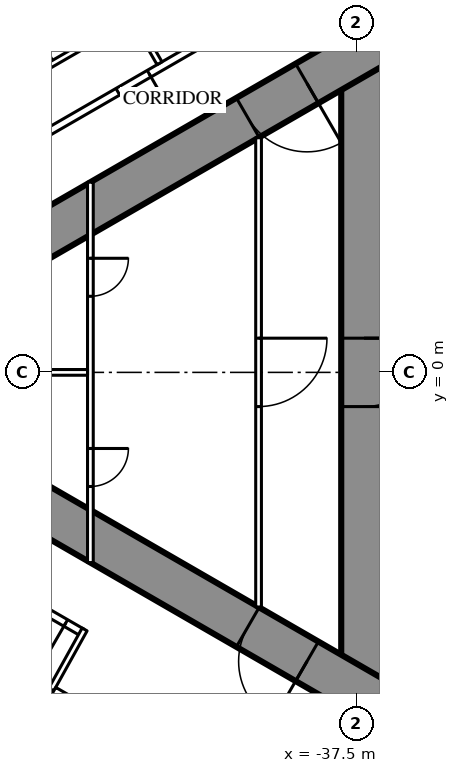
"""IFC4 building model, lengths in metres.
Left out: names, types, materials, properties, quantities, classifications, styles, units other than length and angle.
Written with IfcOpenShell. Run it as: python <this file> out.ifc"""

import sys

from ifc_helpers import new_model, si_unit, direction, frame, frame_2d, origin, place, context, subcontext, project, spatial, rectangle, extrude, element, fill, save


model = new_model("IFC4")
c1 = context("Model", 3, precision=1e-05, world=origin(), true_north=direction((0.0, 1.0)))
c2 = subcontext(c1, "Body", "Model", "MODEL_VIEW")
j1 = project(units=[si_unit("LENGTHUNIT", "METRE"), si_unit("PLANEANGLEUNIT", "RADIAN")], contexts=[c1])
p1 = place(None, origin())
s1 = spatial("IfcSite", under=j1, at=p1, CompositionType="ELEMENT")
p2 = place(p1, origin())
s2 = spatial("IfcBuilding", under=s1, at=p2, CompositionType="ELEMENT")
p3 = place(p2, frame((0.0, 0.0, 222.5)))
s3 = spatial("IfcBuildingStorey", under=s2, at=p3, CompositionType="ELEMENT", Elevation=222.5)
p4 = place(p3, frame((-37.3, 8.6, 0.0), z_axis=(0.0, 0.0, 1.0), x_axis=(0.0, -1.0, 0.0)))
e1 = element("IfcWall", 1, at=p4, inside=s3, PredefinedType="SHEAR", context=c2, shape_type="SweptSolid", body=[
    extrude(rectangle(XDim=17.2, YDim=1.2, at=frame_2d((8.6, 0.0))), origin(), (0.0, 0.0, 1.0), 3.6),
])
p5 = place(p4, frame((7.7, 0.0, 0.0)))
e2 = element("IfcOpeningElement", 2, at=p5, cuts=e1, PredefinedType="OPENING", context=c2, shape_type="SweptSolid", body=[
    extrude(rectangle(XDim=1.8, YDim=2.2, at=frame_2d((0.9, 1.1))), frame((0.0, 0.61, 0.0), z_axis=(0.0, -1.0, 0.0), x_axis=(1.0, 0.0, 0.0)), (0.0, 0.0, 1.0), 1.22),
])
p6 = place(p3, frame((-27.2, 14.3, 0.0), z_axis=(0.0, 0.0, 1.0), x_axis=(-0.866026593062, -0.499997940104, 0.0)))
e3 = element("IfcWall", 3, at=p6, inside=s3, PredefinedType="SHEAR", context=c2, shape_type="SweptSolid", body=[
    extrude(rectangle(XDim=28.946, YDim=1.2, at=frame_2d((14.473, 0.0))), origin(), (0.0, 0.0, 1.0), 3.6),
])
p7 = place(p6, frame((4.6, 0.0, 0.0)))
e4 = element("IfcOpeningElement", 4, at=p7, cuts=e3, PredefinedType="OPENING", context=c2, shape_type="SweptSolid", body=[
    extrude(rectangle(XDim=1.0, YDim=2.2, at=frame_2d((0.5, 1.1))), frame((0.0, 0.61, 0.0), z_axis=(0.0, -1.0, 0.0), x_axis=(1.0, 0.0, 0.0)), (0.0, 0.0, 1.0), 1.22),
])
p8 = place(p6, frame((13.395, 0.0, 0.0)))
e5 = element("IfcOpeningElement", 5, at=p8, cuts=e3, PredefinedType="OPENING", context=c2, shape_type="SweptSolid", body=[
    extrude(rectangle(XDim=1.8, YDim=2.2, at=frame_2d((0.9, 1.1))), frame((0.0, 0.61, 0.0), z_axis=(0.0, -1.0, 0.0), x_axis=(1.0, 0.0, 0.0)), (0.0, 0.0, 1.0), 1.22),
])
p9 = place(p3, frame((-27.2, -14.3, 0.0), z_axis=(0.0, 0.0, 1.0), x_axis=(-0.866024021859, 0.500002393557, 0.0)))
e6 = element("IfcWall", 6, at=p9, inside=s3, PredefinedType="SHEAR", context=c2, shape_type="SweptSolid", body=[
    extrude(rectangle(XDim=27.907, YDim=1.2, at=frame_2d((13.954, 0.0))), origin(), (0.0, 0.0, 1.0), 3.6),
])
p10 = place(p9, frame((4.6, 0.0, 0.0)))
e7 = element("IfcOpeningElement", 7, at=p10, cuts=e6, PredefinedType="OPENING", context=c2, shape_type="SweptSolid", body=[
    extrude(rectangle(XDim=1.0, YDim=2.2, at=frame_2d((0.5, 1.1))), frame((0.0, 0.61, 0.0), z_axis=(0.0, -1.0, 0.0), x_axis=(1.0, 0.0, 0.0)), (0.0, 0.0, 1.0), 1.22),
])
p11 = place(p9, frame((13.395, 0.0, 0.0)))
e8 = element("IfcOpeningElement", 8, at=p11, cuts=e6, PredefinedType="OPENING", context=c2, shape_type="SweptSolid", body=[
    extrude(rectangle(XDim=1.8, YDim=2.2, at=frame_2d((0.9, 1.1))), frame((0.0, 0.61, 0.0), z_axis=(0.0, -1.0, 0.0), x_axis=(1.0, 0.0, 0.0)), (0.0, 0.0, 1.0), 1.22),
])
p12 = place(p3, frame((-28.737, 16.068, 0.0), z_axis=(0.0, 0.0, 1.0), x_axis=(-0.866026057212, -0.499998868229, 0.0)))
e9 = element("IfcWall", 9, at=p12, inside=s3, PredefinedType="PARTITIONING", context=c2, shape_type="SweptSolid", body=[
    extrude(rectangle(XDim=32.137, YDim=0.2, at=frame_2d((16.068, 0.0))), origin(), (0.0, 0.0, 1.0), 3.35),
])
p13 = place(p12, frame((1.08, 0.0, 0.0)))
e10 = element("IfcOpeningElement", 10, at=p13, cuts=e9, PredefinedType="OPENING", context=c2, shape_type="SweptSolid", body=[
    extrude(rectangle(XDim=1.8, YDim=2.03, at=frame_2d((0.9, 1.015))), frame((0.0, 0.11, 0.0), z_axis=(0.0, -1.0, 0.0), x_axis=(1.0, 0.0, 0.0)), (0.0, 0.0, 1.0), 0.22),
])
p14 = place(p12, frame((6.86, 0.0, 0.0)))
e11 = element("IfcOpeningElement", 11, at=p14, cuts=e9, PredefinedType="OPENING", context=c2, shape_type="SweptSolid", body=[
    extrude(rectangle(XDim=1.0, YDim=2.2, at=frame_2d((0.5, 1.1))), frame((0.0, 0.11, 0.0), z_axis=(0.0, -1.0, 0.0), x_axis=(1.0, 0.0, 0.0)), (0.0, 0.0, 1.0), 0.22),
])
p15 = place(p12, frame((16.418, 0.0, 0.0)))
e12 = element("IfcOpeningElement", 12, at=p15, cuts=e9, PredefinedType="OPENING", context=c2, shape_type="SweptSolid", body=[
    extrude(rectangle(XDim=0.95, YDim=2.2, at=frame_2d((0.475, 1.1))), frame((0.0, 0.11, 0.0), z_axis=(0.0, -1.0, 0.0), x_axis=(1.0, 0.0, 0.0)), (0.0, 0.0, 1.0), 0.22),
])
p16 = place(p12, frame((20.567, 0.0, 0.0)))
e13 = element("IfcOpeningElement", 13, at=p16, cuts=e9, PredefinedType="OPENING", context=c2, shape_type="SweptSolid", body=[
    extrude(rectangle(XDim=0.95, YDim=2.2, at=frame_2d((0.475, 1.1))), frame((0.0, 0.11, 0.0), z_axis=(0.0, -1.0, 0.0), x_axis=(1.0, 0.0, 0.0)), (0.0, 0.0, 1.0), 0.22),
])
p17 = place(p12, frame((27.065, 0.0, 0.0)))
e14 = element("IfcOpeningElement", 14, at=p17, cuts=e9, PredefinedType="OPENING", context=c2, shape_type="SweptSolid", body=[
    extrude(rectangle(XDim=0.95, YDim=2.2, at=frame_2d((0.475, 1.1))), frame((0.0, 0.11, 0.0), z_axis=(0.0, -1.0, 0.0), x_axis=(1.0, 0.0, 0.0)), (0.0, 0.0, 1.0), 0.22),
])
p18 = place(p3, frame((-42.68, 8.134, 0.0), z_axis=(0.0, 0.0, 1.0), x_axis=(-0.499984479505, 0.866034364361, 0.0)))
e15 = element("IfcWall", 15, at=p18, inside=s3, PredefinedType="PARTITIONING", context=c2, shape_type="SweptSolid", body=[
    extrude(rectangle(XDim=5.995, YDim=0.15, at=frame_2d((2.998, 0.0))), origin(), (0.0, 0.0, 1.0), 2.45),
])
p19 = place(p3, frame((-44.715, -6.844, 0.0), z_axis=(0.0, 0.0, 1.0), x_axis=(-0.866025261224, 0.500000246922, 0.0)))
e16 = element("IfcWall", 16, at=p19, inside=s3, PredefinedType="PARTITIONING", context=c2, shape_type="SweptSolid", body=[
    extrude(rectangle(XDim=13.567, YDim=0.2, at=frame_2d((6.783, 0.0))), origin(), (0.0, 0.0, 1.0), 3.35),
])
p20 = place(p19, frame((9.667, 0.0, 0.0)))
e17 = element("IfcOpeningElement", 17, at=p20, cuts=e16, PredefinedType="OPENING", context=c2, shape_type="SweptSolid", body=[
    extrude(rectangle(XDim=0.95, YDim=2.2, at=frame_2d((0.475, 1.1))), frame((0.0, 0.11, 0.0), z_axis=(0.0, -1.0, 0.0), x_axis=(1.0, 0.0, 0.0)), (0.0, 0.0, 1.0), 0.22),
])
p21 = place(p19, frame((2.117, 0.0, 0.0)))
e18 = element("IfcOpeningElement", 18, at=p21, cuts=e16, PredefinedType="OPENING", context=c2, shape_type="SweptSolid", body=[
    extrude(rectangle(XDim=0.95, YDim=2.2, at=frame_2d((0.475, 1.1))), frame((0.0, 0.11, 0.0), z_axis=(0.0, -1.0, 0.0), x_axis=(1.0, 0.0, 0.0)), (0.0, 0.0, 1.0), 0.22),
])
p22 = place(p19, frame((0.5, 0.0, 0.0)))
e19 = element("IfcOpeningElement", 19, at=p22, cuts=e16, PredefinedType="OPENING", context=c2, shape_type="SweptSolid", body=[
    extrude(rectangle(XDim=0.967, YDim=2.2, at=frame_2d((0.483, 1.1))), frame((0.0, 0.11, 0.0), z_axis=(0.0, -1.0, 0.0), x_axis=(1.0, 0.0, 0.0)), (0.0, 0.0, 1.0), 0.22),
])
p23 = place(p3, frame((-44.652, -6.764, 0.0), z_axis=(0.0, 0.0, 1.0), x_axis=(-0.485424724123, -0.874278466629, 0.0)))
e20 = element("IfcWall", 20, at=p23, inside=s3, PredefinedType="PARTITIONING", context=c2, shape_type="SweptSolid", body=[
    extrude(rectangle(XDim=1.805, YDim=0.15, at=frame_2d((0.903, 0.0))), origin(), (0.0, 0.0, 1.0), 3.35),
])
p24 = place(p3, frame((-45.524, 8.109, 0.0), z_axis=(0.0, 0.0, 1.0), x_axis=(-0.49997716683, 0.86603858612, 0.0)))
e21 = element("IfcWall", 21, at=p24, inside=s3, PredefinedType="PARTITIONING", context=c2, shape_type="SweptSolid", body=[
    extrude(rectangle(XDim=2.6, YDim=0.15, at=frame_2d((1.3, 0.0))), origin(), (0.0, 0.0, 1.0), 3.35),
])
p25 = place(p24, frame((0.9, 0.0, 0.0)))
e22 = element("IfcOpeningElement", 22, at=p25, cuts=e21, PredefinedType="OPENING", context=c2, shape_type="SweptSolid", body=[
    extrude(rectangle(XDim=0.8, YDim=2.2, at=frame_2d((0.4, 1.1))), frame((0.0, 0.085, 0.0), z_axis=(0.0, -1.0, 0.0), x_axis=(1.0, 0.0, 0.0)), (0.0, 0.0, 1.0), 0.17),
])
p26 = place(p3, frame((-43.445, 9.309, 0.0), z_axis=(0.0, 0.0, 1.0), x_axis=(-0.866031185235, -0.4999899861, 0.0)))
e23 = element("IfcWall", 23, at=p26, inside=s3, PredefinedType="PARTITIONING", context=c2, shape_type="SweptSolid", body=[
    extrude(rectangle(XDim=2.475, YDim=0.15, at=frame_2d((1.238, 0.0))), origin(), (0.0, 0.0, 1.0), 3.35),
])
p27 = place(p3, frame((-40.075, 6.174, 0.0), z_axis=(0.0, 0.0, 1.0), x_axis=(0.0, -1.0, 0.0)))
e24 = element("IfcWall", 24, at=p27, inside=s3, PredefinedType="PARTITIONING", context=c2, shape_type="SweptSolid", body=[
    extrude(rectangle(XDim=12.348, YDim=0.15, at=frame_2d((6.174, 0.0))), origin(), (0.0, 0.0, 1.0), 3.35),
])
p28 = place(p27, frame((5.274, 0.0, 0.0)))
e25 = element("IfcOpeningElement", 25, at=p28, cuts=e24, PredefinedType="OPENING", context=c2, shape_type="SweptSolid", body=[
    extrude(rectangle(XDim=1.8, YDim=2.2, at=frame_2d((0.9, 1.1))), frame((0.0, 0.085, 0.0), z_axis=(0.0, -1.0, 0.0), x_axis=(1.0, 0.0, 0.0)), (0.0, 0.0, 1.0), 0.17),
])
p29 = place(p3, frame((-44.5, 5.005, 0.0), z_axis=(0.0, 0.0, 1.0), x_axis=(0.0, -1.0, 0.0)))
e26 = element("IfcWall", 26, at=p29, inside=s3, PredefinedType="PARTITIONING", context=c2, shape_type="SweptSolid", body=[
    extrude(rectangle(XDim=10.009, YDim=0.15, at=frame_2d((5.005, 0.0))), origin(), (0.0, 0.0, 1.0), 2.5),
])
p30 = place(p29, frame((2.002, 0.0, 0.0)))
e27 = element("IfcOpeningElement", 27, at=p30, cuts=e26, PredefinedType="OPENING", context=c2, shape_type="SweptSolid", body=[
    extrude(rectangle(XDim=1.0, YDim=2.2, at=frame_2d((0.5, 1.1))), frame((0.0, 0.085, 0.0), z_axis=(0.0, -1.0, 0.0), x_axis=(1.0, 0.0, 0.0)), (0.0, 0.0, 1.0), 0.17),
])
p31 = place(p29, frame((7.007, 0.0, 0.0)))
e28 = element("IfcOpeningElement", 28, at=p31, cuts=e26, PredefinedType="OPENING", context=c2, shape_type="SweptSolid", body=[
    extrude(rectangle(XDim=1.0, YDim=2.2, at=frame_2d((0.5, 1.1))), frame((0.0, 0.085, 0.0), z_axis=(0.0, -1.0, 0.0), x_axis=(1.0, 0.0, 0.0)), (0.0, 0.0, 1.0), 0.17),
])
p32 = place(p3, frame((-44.575, 0.0, 0.0), z_axis=(0.0, 0.0, 1.0), x_axis=(-1.0, 0.0, 0.0)))
e29 = element("IfcWall", 29, at=p32, inside=s3, PredefinedType="PARTITIONING", context=c2, shape_type="SweptSolid", body=[
    extrude(rectangle(XDim=8.593, YDim=0.15, at=frame_2d((4.297, 0.0))), origin(), (0.0, 0.0, 1.0), 2.45),
])
p33 = place(p3, frame((-39.758, -11.697, 0.0), z_axis=(0.0, 0.0, 1.0), x_axis=(-0.866024194504, 0.500002094529, 0.0)))
e30 = element("IfcWall", 30, at=p33, inside=s3, PredefinedType="PARTITIONING", context=c2, shape_type="SweptSolid", body=[
    extrude(rectangle(XDim=6.6, YDim=0.25, at=frame_2d((3.3, 0.0))), origin(), (0.0, 0.0, 1.0), 3.35),
])
p34 = place(p33, frame((0.75, 0.0, 0.0)))
e31 = element("IfcOpeningElement", 31, at=p34, cuts=e30, PredefinedType="OPENING", context=c2, shape_type="SweptSolid", body=[
    extrude(rectangle(XDim=1.1, YDim=2.2, at=frame_2d((0.55, 1.1))), frame((0.0, 0.135, 0.0), z_axis=(0.0, -1.0, 0.0), x_axis=(1.0, 0.0, 0.0)), (0.0, 0.0, 1.0), 0.27),
])
p35 = place(p33, frame((2.75, 0.0, 0.0)))
e32 = element("IfcOpeningElement", 32, at=p35, cuts=e30, PredefinedType="OPENING", context=c2, shape_type="SweptSolid", body=[
    extrude(rectangle(XDim=1.1, YDim=2.2, at=frame_2d((0.55, 1.1))), frame((0.0, 0.135, 0.0), z_axis=(0.0, -1.0, 0.0), x_axis=(1.0, 0.0, 0.0)), (0.0, 0.0, 1.0), 0.27),
])
p36 = place(p33, frame((4.75, 0.0, 0.0)))
e33 = element("IfcOpeningElement", 33, at=p36, cuts=e30, PredefinedType="OPENING", context=c2, shape_type="SweptSolid", body=[
    extrude(rectangle(XDim=1.1, YDim=2.2, at=frame_2d((0.55, 1.1))), frame((0.0, 0.135, 0.0), z_axis=(0.0, -1.0, 0.0), x_axis=(1.0, 0.0, 0.0)), (0.0, 0.0, 1.0), 0.27),
])
p37 = place(p15, origin())
e34 = element("IfcDoor", 34, at=p37, inside=s3, OperationType="SINGLE_SWING_LEFT", PredefinedType="DOOR", context=c2, shape_type="SweptSolid", body=[
    extrude(rectangle(XDim=0.95, YDim=2.2, at=frame_2d((0.475, 1.1))), frame((0.0, 0.025, 0.0), z_axis=(0.0, -1.0, 0.0), x_axis=(1.0, 0.0, 0.0)), (0.0, 0.0, 1.0), 0.05),
])
fill(e12, e34)
p38 = place(p22, origin())
e35 = element("IfcDoor", 35, at=p38, inside=s3, OperationType="SINGLE_SWING_LEFT", PredefinedType="DOOR", context=c2, shape_type="SweptSolid", body=[
    extrude(rectangle(XDim=0.967, YDim=2.2, at=frame_2d((0.483, 1.1))), frame((0.0, 0.025, 0.0), z_axis=(0.0, -1.0, 0.0), x_axis=(1.0, 0.0, 0.0)), (0.0, 0.0, 1.0), 0.05),
])
fill(e19, e35)
p39 = place(p28, origin())
e36 = element("IfcDoor", 36, at=p39, inside=s3, OperationType="DOUBLE_DOOR_SINGLE_SWING", PredefinedType="DOOR", context=c2, shape_type="SweptSolid", body=[
    extrude(rectangle(XDim=1.8, YDim=2.2, at=frame_2d((0.9, 1.1))), frame((0.0, 0.025, 0.0), z_axis=(0.0, -1.0, 0.0), x_axis=(1.0, 0.0, 0.0)), (0.0, 0.0, 1.0), 0.05),
])
fill(e25, e36)
p40 = place(p30, origin())
e37 = element("IfcDoor", 37, at=p40, inside=s3, OperationType="SINGLE_SWING_LEFT", PredefinedType="DOOR", context=c2, shape_type="SweptSolid", body=[
    extrude(rectangle(XDim=1.0, YDim=2.2, at=frame_2d((0.5, 1.1))), frame((0.0, 0.025, 0.0), z_axis=(0.0, -1.0, 0.0), x_axis=(1.0, 0.0, 0.0)), (0.0, 0.0, 1.0), 0.05),
])
fill(e27, e37)
p41 = place(p31, origin())
e38 = element("IfcDoor", 38, at=p41, inside=s3, OperationType="SINGLE_SWING_LEFT", PredefinedType="DOOR", context=c2, shape_type="SweptSolid", body=[
    extrude(rectangle(XDim=1.0, YDim=2.2, at=frame_2d((0.5, 1.1))), frame((0.0, 0.025, 0.0), z_axis=(0.0, -1.0, 0.0), x_axis=(1.0, 0.0, 0.0)), (0.0, 0.0, 1.0), 0.05),
])
fill(e28, e38)
p42 = place(p8, origin())
e39 = element("IfcDoor", 39, at=p42, inside=s3, OperationType="DOUBLE_DOOR_SINGLE_SWING", PredefinedType="DOOR", context=c2, shape_type="SweptSolid", body=[
    extrude(rectangle(XDim=1.8, YDim=2.2, at=frame_2d((0.9, 1.1))), frame((0.0, 0.025, 0.0), z_axis=(0.0, -1.0, 0.0), x_axis=(1.0, 0.0, 0.0)), (0.0, 0.0, 1.0), 0.05),
])
fill(e5, e39)
p43 = place(p11, origin())
e40 = element("IfcDoor", 40, at=p43, inside=s3, OperationType="DOUBLE_DOOR_SINGLE_SWING", PredefinedType="DOOR", context=c2, shape_type="SweptSolid", body=[
    extrude(rectangle(XDim=1.8, YDim=2.2, at=frame_2d((0.9, 1.1))), frame((0.0, 0.025, 0.0), z_axis=(0.0, -1.0, 0.0), x_axis=(1.0, 0.0, 0.0)), (0.0, 0.0, 1.0), 0.05),
])
fill(e8, e40)
p44 = place(p5, origin())
e41 = element("IfcDoor", 41, at=p44, inside=s3, OperationType="DOUBLE_DOOR_SINGLE_SWING", PredefinedType="DOOR", context=c2, shape_type="SweptSolid", body=[
    extrude(rectangle(XDim=1.8, YDim=2.2, at=frame_2d((0.9, 1.1))), frame((0.0, 0.025, 0.0), z_axis=(0.0, -1.0, 0.0), x_axis=(1.0, 0.0, 0.0)), (0.0, 0.0, 1.0), 0.05),
])
fill(e2, e41)
save(model, sys.argv[1])
